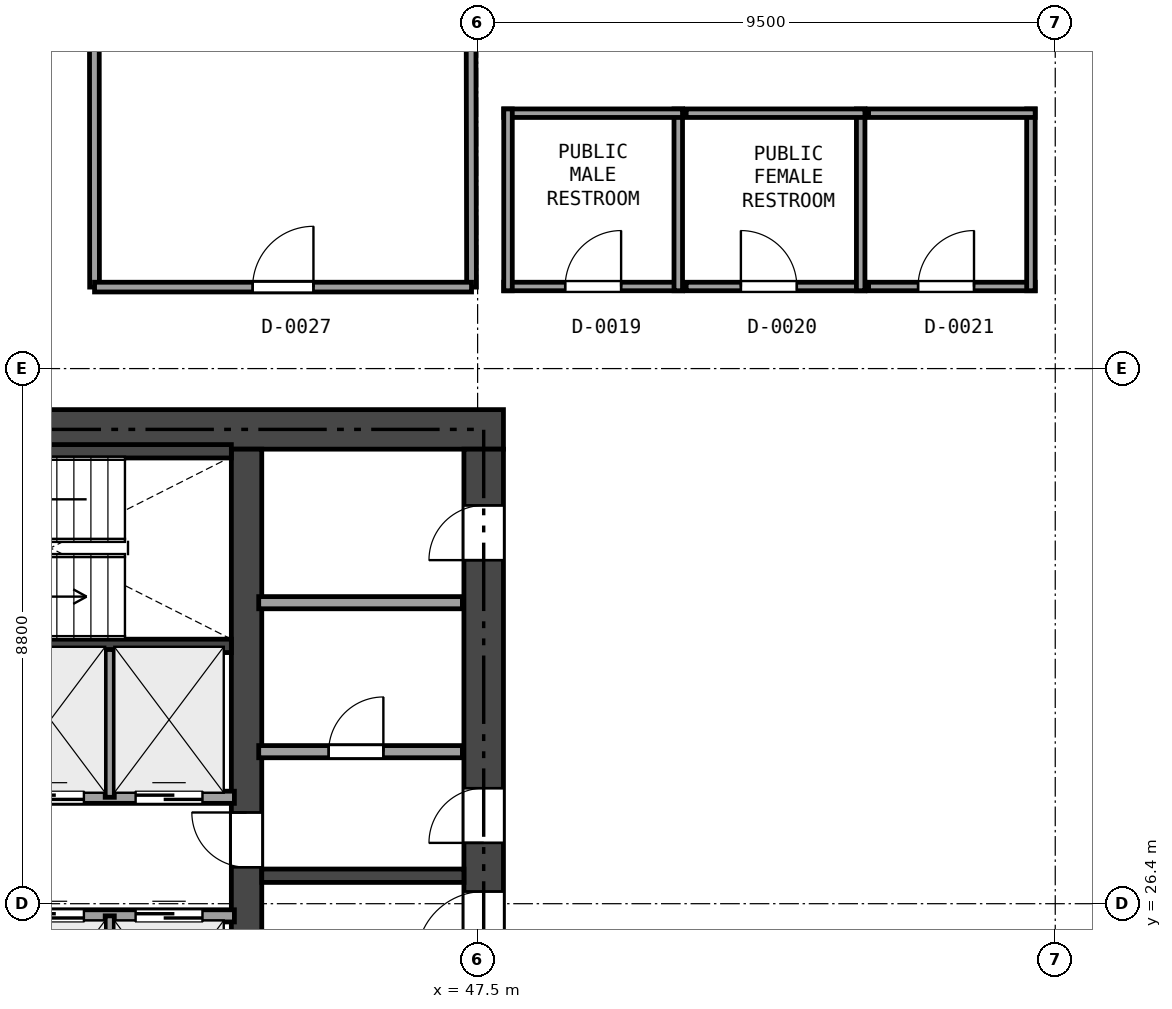
"""IFC4 building model, lengths in metres.
Left out: names, types, materials, properties, quantities, classifications, styles, units other than length and angle.
Written with IfcOpenShell. Run it as: python <this file> out.ifc"""

import sys

from ifc_helpers import new_model, si_unit, direction, frame, frame_2d, origin, place, context, subcontext, project, spatial, rectangle, extrude, element, fill, save


model = new_model("IFC4")
c1 = context("Model", 3, precision=1e-05, world=origin(), true_north=direction((0.0, 1.0)))
c2 = subcontext(c1, "Body", "Model", "MODEL_VIEW")
j1 = project(units=[si_unit("LENGTHUNIT", "METRE"), si_unit("PLANEANGLEUNIT", "RADIAN")], contexts=[c1])
p1 = place(None, origin())
s1 = spatial("IfcSite", under=j1, at=p1, CompositionType="ELEMENT")
p2 = place(p1, origin())
s2 = spatial("IfcBuilding", under=s1, at=p2, CompositionType="ELEMENT")
p3 = place(p2, origin())
s3 = spatial("IfcBuildingStorey", under=s2, at=p3, CompositionType="ELEMENT", Elevation=0.0)
p4 = place(p3, frame((26.475, 34.2, 0.0), z_axis=(0.0, 0.0, 1.0), x_axis=(1.0, 0.0, 0.0)))
e1 = element("IfcWall", 1, at=p4, inside=s3, PredefinedType="SHEAR", context=c2, shape_type="SweptSolid", body=[
    extrude(rectangle(XDim=21.45, YDim=0.65, at=frame_2d((10.725, 0.0))), origin(), (0.0, 0.0, 1.0), 5.05),
])
p5 = place(p4, frame((9.725, 0.0, 0.0)))
e2 = element("IfcOpeningElement", 2, at=p5, cuts=e1, PredefinedType="OPENING", context=c2, shape_type="SweptSolid", body=[
    extrude(rectangle(XDim=1.1, YDim=2.15, at=frame_2d((0.55, 1.075))), frame((0.0, 0.335, 0.0), z_axis=(0.0, -1.0, 0.0), x_axis=(1.0, 0.0, 0.0)), (0.0, 0.0, 1.0), 0.67),
])
p6 = place(p4, frame((1.975, 0.0, 0.0)))
e3 = element("IfcOpeningElement", 3, at=p6, cuts=e1, PredefinedType="OPENING", context=c2, shape_type="SweptSolid", body=[
    extrude(rectangle(XDim=0.9, YDim=2.1, at=frame_2d((0.45, 1.05))), frame((0.0, 0.335, 0.0), z_axis=(0.0, -1.0, 0.0), x_axis=(1.0, 0.0, 0.0)), (0.0, 0.0, 1.0), 0.67),
])
p7 = place(p4, frame((6.275, 0.0, 0.0)))
e4 = element("IfcOpeningElement", 4, at=p7, cuts=e1, PredefinedType="OPENING", context=c2, shape_type="SweptSolid", body=[
    extrude(rectangle(XDim=0.9, YDim=2.1, at=frame_2d((0.45, 1.05))), frame((0.0, 0.335, 0.0), z_axis=(0.0, -1.0, 0.0), x_axis=(1.0, 0.0, 0.0)), (0.0, 0.0, 1.0), 0.67),
])
p8 = place(p3, frame((47.6, 18.925, 0.0), z_axis=(0.0, 0.0, 1.0), x_axis=(0.0, 1.0, 0.0)))
e5 = element("IfcWall", 5, at=p8, inside=s3, PredefinedType="SHEAR", context=c2, shape_type="SweptSolid", body=[
    extrude(rectangle(XDim=14.95, YDim=0.65, at=frame_2d((7.475, 0.0))), origin(), (0.0, 0.0, 1.0), 5.05),
])
p9 = place(p8, frame((6.575, 0.0, 0.0)))
e6 = element("IfcOpeningElement", 6, at=p9, cuts=e5, PredefinedType="OPENING", context=c2, shape_type="SweptSolid", body=[
    extrude(rectangle(XDim=1.1, YDim=2.15, at=frame_2d((0.55, 1.075))), frame((0.0, 0.335, 0.0), z_axis=(0.0, -1.0, 0.0), x_axis=(1.0, 0.0, 0.0)), (0.0, 0.0, 1.0), 0.67),
])
p10 = place(p8, frame((8.475, 0.0, 0.0)))
e7 = element("IfcOpeningElement", 7, at=p10, cuts=e5, PredefinedType="OPENING", context=c2, shape_type="SweptSolid", body=[
    extrude(rectangle(XDim=0.9, YDim=2.1, at=frame_2d((0.45, 1.05))), frame((0.0, 0.335, 0.0), z_axis=(0.0, -1.0, 0.0), x_axis=(1.0, 0.0, 0.0)), (0.0, 0.0, 1.0), 0.67),
])
p11 = place(p8, frame((13.125, 0.0, 0.0)))
e8 = element("IfcOpeningElement", 8, at=p11, cuts=e5, PredefinedType="OPENING", context=c2, shape_type="SweptSolid", body=[
    extrude(rectangle(XDim=0.9, YDim=2.1, at=frame_2d((0.45, 1.05))), frame((0.0, 0.335, 0.0), z_axis=(0.0, -1.0, 0.0), x_axis=(1.0, 0.0, 0.0)), (0.0, 0.0, 1.0), 0.67),
])
p12 = place(p3, frame((43.7, 18.925, 0.0), z_axis=(0.0, 0.0, 1.0), x_axis=(0.0, 1.0, 0.0)))
e9 = element("IfcWall", 9, at=p12, inside=s3, PredefinedType="SHEAR", context=c2, shape_type="SweptSolid", body=[
    extrude(rectangle(XDim=14.95, YDim=0.5, at=frame_2d((7.475, 0.0))), origin(), (0.0, 0.0, 1.0), 5.05),
])
p13 = place(p12, frame((8.075, 0.0, 0.0)))
e10 = element("IfcOpeningElement", 10, at=p13, cuts=e9, PredefinedType="OPENING", context=c2, shape_type="SweptSolid", body=[
    extrude(rectangle(XDim=0.9, YDim=2.1, at=frame_2d((0.45, 1.05))), frame((0.0, 0.26, 0.0), z_axis=(0.0, -1.0, 0.0), x_axis=(1.0, 0.0, 0.0)), (0.0, 0.0, 1.0), 0.52),
])
p14 = place(p3, frame((43.95, 26.86, 0.0), z_axis=(0.0, 0.0, 1.0), x_axis=(1.0, 0.0, 0.0)))
e11 = element("IfcWall", 11, at=p14, inside=s3, PredefinedType="SHEAR", context=c2, shape_type="SweptSolid", body=[
    extrude(rectangle(XDim=3.325, YDim=0.22, at=frame_2d((1.663, 0.0))), origin(), (0.0, 0.0, 1.0), 5.05),
])
p15 = place(p3, frame((35.84, 30.64, 0.0), z_axis=(0.0, 0.0, 1.0), x_axis=(1.0, 0.0, 0.0)))
e12 = element("IfcWall", 12, at=p15, inside=s3, PredefinedType="SHEAR", context=c2, shape_type="SweptSolid", body=[
    extrude(rectangle(XDim=7.61, YDim=0.22, at=frame_2d((3.805, 0.0))), origin(), (0.0, 0.0, 1.0), 5.05),
])
p16 = place(p3, frame((37.55, 33.84, 0.0), z_axis=(0.0, 0.0, 1.0), x_axis=(1.0, 0.0, 0.0)))
e13 = element("IfcWall", 13, at=p16, inside=s3, PredefinedType="SHEAR", context=c2, shape_type="SweptSolid", body=[
    extrude(rectangle(XDim=5.9, YDim=0.22, at=frame_2d((2.95, 0.0))), origin(), (0.0, 0.0, 1.0), 5.05),
])
p17 = place(p3, frame((43.9, 28.9, 0.0), z_axis=(0.0, 0.0, 1.0), x_axis=(1.0, 0.0, 0.0)))
e14 = element("IfcWall", 14, at=p17, inside=s3, PredefinedType="SOLIDWALL", context=c2, shape_type="SweptSolid", body=[
    extrude(rectangle(XDim=3.35, YDim=0.2, at=frame_2d((1.675, 0.0))), origin(), (0.0, 0.0, 1.0), 5.05),
])
p18 = place(p17, frame((1.15, 0.0, 0.0)))
e15 = element("IfcOpeningElement", 15, at=p18, cuts=e14, PredefinedType="OPENING", context=c2, shape_type="SweptSolid", body=[
    extrude(rectangle(XDim=0.9, YDim=2.1, at=frame_2d((0.45, 1.05))), frame((0.0, 0.11, 0.0), z_axis=(0.0, -1.0, 0.0), x_axis=(1.0, 0.0, 0.0)), (0.0, 0.0, 1.0), 0.22),
])
p19 = place(p3, frame((43.9, 31.35, 0.0), z_axis=(0.0, 0.0, 1.0), x_axis=(1.0, 0.0, 0.0)))
e16 = element("IfcWall", 16, at=p19, inside=s3, PredefinedType="SOLIDWALL", context=c2, shape_type="SweptSolid", body=[
    extrude(rectangle(XDim=3.35, YDim=0.2, at=frame_2d((1.675, 0.0))), origin(), (0.0, 0.0, 1.0), 5.05),
])
p20 = place(p3, frame((35.62, 28.15, 0.0), z_axis=(0.0, 0.0, 1.0), x_axis=(1.0, 0.0, 0.0)))
e17 = element("IfcWall", 17, at=p20, inside=s3, PredefinedType="SOLIDWALL", context=c2, shape_type="SweptSolid", body=[
    extrude(rectangle(XDim=7.88, YDim=0.2, at=frame_2d((3.94, 0.0))), origin(), (0.0, 0.0, 1.0), 5.05),
])
p21 = place(p20, frame((0.405, 0.0, 0.0)))
e18 = element("IfcOpeningElement", 18, at=p21, cuts=e17, PredefinedType="OPENING", context=c2, shape_type="SweptSolid", body=[
    extrude(rectangle(XDim=1.1, YDim=2.15, at=frame_2d((0.55, 1.075))), frame((0.0, 0.11, 0.0), z_axis=(0.0, -1.0, 0.0), x_axis=(1.0, 0.0, 0.0)), (0.0, 0.0, 1.0), 0.22),
])
p22 = place(p20, frame((2.355, 0.0, 0.0)))
e19 = element("IfcOpeningElement", 19, at=p22, cuts=e17, PredefinedType="OPENING", context=c2, shape_type="SweptSolid", body=[
    extrude(rectangle(XDim=1.1, YDim=2.15, at=frame_2d((0.55, 1.075))), frame((0.0, 0.11, 0.0), z_axis=(0.0, -1.0, 0.0), x_axis=(1.0, 0.0, 0.0)), (0.0, 0.0, 1.0), 0.22),
])
p23 = place(p20, frame((4.305, 0.0, 0.0)))
e20 = element("IfcOpeningElement", 20, at=p23, cuts=e17, PredefinedType="OPENING", context=c2, shape_type="SweptSolid", body=[
    extrude(rectangle(XDim=1.1, YDim=2.15, at=frame_2d((0.55, 1.075))), frame((0.0, 0.11, 0.0), z_axis=(0.0, -1.0, 0.0), x_axis=(1.0, 0.0, 0.0)), (0.0, 0.0, 1.0), 0.22),
])
p24 = place(p20, frame((6.255, 0.0, 0.0)))
e21 = element("IfcOpeningElement", 21, at=p24, cuts=e17, PredefinedType="OPENING", context=c2, shape_type="SweptSolid", body=[
    extrude(rectangle(XDim=1.1, YDim=2.15, at=frame_2d((0.55, 1.075))), frame((0.0, 0.11, 0.0), z_axis=(0.0, -1.0, 0.0), x_axis=(1.0, 0.0, 0.0)), (0.0, 0.0, 1.0), 0.22),
])
p25 = place(p3, frame((35.62, 26.2, 0.0), z_axis=(0.0, 0.0, 1.0), x_axis=(1.0, 0.0, 0.0)))
e22 = element("IfcWall", 22, at=p25, inside=s3, PredefinedType="SOLIDWALL", context=c2, shape_type="SweptSolid", body=[
    extrude(rectangle(XDim=7.88, YDim=0.2, at=frame_2d((3.94, 0.0))), origin(), (0.0, 0.0, 1.0), 5.05),
])
p26 = place(p25, frame((0.405, 0.0, 0.0)))
e23 = element("IfcOpeningElement", 23, at=p26, cuts=e22, PredefinedType="OPENING", context=c2, shape_type="SweptSolid", body=[
    extrude(rectangle(XDim=1.1, YDim=2.15, at=frame_2d((0.55, 1.075))), frame((0.0, 0.11, 0.0), z_axis=(0.0, -1.0, 0.0), x_axis=(1.0, 0.0, 0.0)), (0.0, 0.0, 1.0), 0.22),
])
p27 = place(p25, frame((2.355, 0.0, 0.0)))
e24 = element("IfcOpeningElement", 24, at=p27, cuts=e22, PredefinedType="OPENING", context=c2, shape_type="SweptSolid", body=[
    extrude(rectangle(XDim=1.1, YDim=2.15, at=frame_2d((0.55, 1.075))), frame((0.0, 0.11, 0.0), z_axis=(0.0, -1.0, 0.0), x_axis=(1.0, 0.0, 0.0)), (0.0, 0.0, 1.0), 0.22),
])
p28 = place(p25, frame((4.305, 0.0, 0.0)))
e25 = element("IfcOpeningElement", 25, at=p28, cuts=e22, PredefinedType="OPENING", context=c2, shape_type="SweptSolid", body=[
    extrude(rectangle(XDim=1.1, YDim=2.15, at=frame_2d((0.55, 1.075))), frame((0.0, 0.11, 0.0), z_axis=(0.0, -1.0, 0.0), x_axis=(1.0, 0.0, 0.0)), (0.0, 0.0, 1.0), 0.22),
])
p29 = place(p25, frame((6.255, 0.0, 0.0)))
e26 = element("IfcOpeningElement", 26, at=p29, cuts=e22, PredefinedType="OPENING", context=c2, shape_type="SweptSolid", body=[
    extrude(rectangle(XDim=1.1, YDim=2.15, at=frame_2d((0.55, 1.075))), frame((0.0, 0.11, 0.0), z_axis=(0.0, -1.0, 0.0), x_axis=(1.0, 0.0, 0.0)), (0.0, 0.0, 1.0), 0.22),
])
p30 = place(p3, frame((41.45, 28.15, 0.0), z_axis=(0.0, 0.0, 1.0), x_axis=(0.0, 1.0, 0.0)))
e27 = element("IfcWall", 27, at=p30, inside=s3, PredefinedType="PARTITIONING", context=c2, shape_type="SweptSolid", body=[
    extrude(rectangle(XDim=2.43, YDim=0.15, at=frame_2d((1.215, 0.0))), origin(), (0.0, 0.0, 1.0), 5.05),
])
p31 = place(p3, frame((41.45, 23.65, 0.0), z_axis=(0.0, 0.0, 1.0), x_axis=(0.0, 1.0, 0.0)))
e28 = element("IfcWall", 28, at=p31, inside=s3, PredefinedType="PARTITIONING", context=c2, shape_type="SweptSolid", body=[
    extrude(rectangle(XDim=2.55, YDim=0.15, at=frame_2d((1.275, 0.0))), origin(), (0.0, 0.0, 1.0), 4.571),
])
p32 = place(p3, frame((47.93, 36.55, 0.0), z_axis=(0.0, 0.0, 1.0), x_axis=(1.0, 0.0, 0.0)))
e29 = element("IfcWall", 29, at=p32, inside=s3, PredefinedType="PARTITIONING", context=c2, shape_type="SweptSolid", body=[
    extrude(rectangle(XDim=2.94, YDim=0.14, at=frame_2d((1.47, 0.0))), origin(), (0.0, 0.0, 1.0), 4.135),
])
p33 = place(p32, frame((1.01, 0.0, 0.0)))
e30 = element("IfcOpeningElement", 30, at=p33, cuts=e29, PredefinedType="OPENING", context=c2, shape_type="SweptSolid", body=[
    extrude(rectangle(XDim=0.92, YDim=2.1, at=frame_2d((0.46, 1.05))), frame((0.0, 0.08, 0.0), z_axis=(0.0, -1.0, 0.0), x_axis=(1.0, 0.0, 0.0)), (0.0, 0.0, 1.0), 0.16),
])
p34 = place(p3, frame((50.8, 36.48, 0.0), z_axis=(0.0, 0.0, 1.0), x_axis=(0.0, 1.0, 0.0)))
e31 = element("IfcWall", 31, at=p34, inside=s3, PredefinedType="PARTITIONING", context=c2, shape_type="SweptSolid", body=[
    extrude(rectangle(XDim=2.99, YDim=0.14, at=frame_2d((1.495, 0.0))), origin(), (0.0, 0.0, 1.0), 4.679),
])
p35 = place(p3, frame((50.87, 39.4, 0.0), z_axis=(0.0, 0.0, 1.0), x_axis=(-1.0, 0.0, 0.0)))
e32 = element("IfcWall", 32, at=p35, inside=s3, PredefinedType="PARTITIONING", context=c2, shape_type="SweptSolid", body=[
    extrude(rectangle(XDim=2.94, YDim=0.14, at=frame_2d((1.47, 0.0))), origin(), (0.0, 0.0, 1.0), 4.135),
])
p36 = place(p3, frame((48.0, 39.47, 0.0), z_axis=(0.0, 0.0, 1.0), x_axis=(0.0, -1.0, 0.0)))
e33 = element("IfcWall", 33, at=p36, inside=s3, PredefinedType="PARTITIONING", context=c2, shape_type="SweptSolid", body=[
    extrude(rectangle(XDim=2.99, YDim=0.14, at=frame_2d((1.495, 0.0))), origin(), (0.0, 0.0, 1.0), 4.135),
])
p37 = place(p3, frame((50.93, 36.55, 0.0), z_axis=(0.0, 0.0, 1.0), x_axis=(1.0, 0.0, 0.0)))
e34 = element("IfcWall", 34, at=p37, inside=s3, PredefinedType="PARTITIONING", context=c2, shape_type="SweptSolid", body=[
    extrude(rectangle(XDim=2.94, YDim=0.14, at=frame_2d((1.47, 0.0))), origin(), (0.0, 0.0, 1.0), 5.05),
])
p38 = place(p37, frame((0.9, 0.0, 0.0)))
e35 = element("IfcOpeningElement", 35, at=p38, cuts=e34, PredefinedType="OPENING", context=c2, shape_type="SweptSolid", body=[
    extrude(rectangle(XDim=0.92, YDim=2.1, at=frame_2d((0.46, 1.05))), frame((0.0, 0.08, 0.0), z_axis=(0.0, -1.0, 0.0), x_axis=(1.0, 0.0, 0.0)), (0.0, 0.0, 1.0), 0.16),
])
p39 = place(p3, frame((53.8, 36.48, 0.0), z_axis=(0.0, 0.0, 1.0), x_axis=(0.0, 1.0, 0.0)))
e36 = element("IfcWall", 36, at=p39, inside=s3, PredefinedType="PARTITIONING", context=c2, shape_type="SweptSolid", body=[
    extrude(rectangle(XDim=2.99, YDim=0.14, at=frame_2d((1.495, 0.0))), origin(), (0.0, 0.0, 1.0), 4.679),
])
p40 = place(p3, frame((53.87, 39.4, 0.0), z_axis=(0.0, 0.0, 1.0), x_axis=(-1.0, 0.0, 0.0)))
e37 = element("IfcWall", 37, at=p40, inside=s3, PredefinedType="PARTITIONING", context=c2, shape_type="SweptSolid", body=[
    extrude(rectangle(XDim=2.94, YDim=0.14, at=frame_2d((1.47, 0.0))), origin(), (0.0, 0.0, 1.0), 4.679),
])
p41 = place(p3, frame((53.93, 36.55, 0.0), z_axis=(0.0, 0.0, 1.0), x_axis=(1.0, 0.0, 0.0)))
e38 = element("IfcWall", 38, at=p41, inside=s3, PredefinedType="PARTITIONING", context=c2, shape_type="SweptSolid", body=[
    extrude(rectangle(XDim=2.74, YDim=0.14, at=frame_2d((1.37, 0.0))), origin(), (0.0, 0.0, 1.0), 5.05),
])
p42 = place(p41, frame((0.814, 0.0, 0.0)))
e39 = element("IfcOpeningElement", 39, at=p42, cuts=e38, PredefinedType="OPENING", context=c2, shape_type="SweptSolid", body=[
    extrude(rectangle(XDim=0.92, YDim=2.1, at=frame_2d((0.46, 1.05))), frame((0.0, 0.08, 0.0), z_axis=(0.0, -1.0, 0.0), x_axis=(1.0, 0.0, 0.0)), (0.0, 0.0, 1.0), 0.16),
])
p43 = place(p3, frame((56.6, 36.48, 0.0), z_axis=(0.0, 0.0, 1.0), x_axis=(0.0, 1.0, 0.0)))
e40 = element("IfcWall", 40, at=p43, inside=s3, PredefinedType="PARTITIONING", context=c2, shape_type="SweptSolid", body=[
    extrude(rectangle(XDim=2.99, YDim=0.14, at=frame_2d((1.495, 0.0))), origin(), (0.0, 0.0, 1.0), 4.679),
])
p44 = place(p3, frame((56.67, 39.4, 0.0), z_axis=(0.0, 0.0, 1.0), x_axis=(-1.0, 0.0, 0.0)))
e41 = element("IfcWall", 41, at=p44, inside=s3, PredefinedType="PARTITIONING", context=c2, shape_type="SweptSolid", body=[
    extrude(rectangle(XDim=2.74, YDim=0.14, at=frame_2d((1.37, 0.0))), origin(), (0.0, 0.0, 1.0), 4.679),
])
p45 = place(p3, frame((47.4, 36.54, 0.0), z_axis=(0.0, 0.0, 1.0), x_axis=(-0.0017799471, 0.999998415893, 0.0)))
e42 = element("IfcWall", 42, at=p45, inside=s3, PredefinedType="PARTITIONING", context=c2, shape_type="SweptSolid", body=[
    extrude(rectangle(XDim=16.185, YDim=0.16, at=frame_2d((8.093, 0.0))), origin(), (0.0, 0.0, 1.0), 4.123),
])
p46 = place(p3, frame((41.188, 52.721, 0.0), z_axis=(0.0, 0.0, 1.0), x_axis=(0.000739321131, -0.999999726702, 0.0)))
e43 = element("IfcWall", 43, at=p46, inside=s3, PredefinedType="PARTITIONING", context=c2, shape_type="SweptSolid", body=[
    extrude(rectangle(XDim=16.181, YDim=0.16, at=frame_2d((8.09, 0.0))), origin(), (0.0, 0.0, 1.0), 4.123),
])
p47 = place(p3, frame((41.2, 36.54, 0.0), z_axis=(0.0, 0.0, 1.0), x_axis=(1.0, 0.0, 0.0)))
e44 = element("IfcWall", 44, at=p47, inside=s3, PredefinedType="PARTITIONING", context=c2, shape_type="SweptSolid", body=[
    extrude(rectangle(XDim=6.2, YDim=0.16, at=frame_2d((3.1, 0.0))), origin(), (0.0, 0.0, 1.0), 5.05),
])
p48 = place(p47, frame((2.6, 0.0, 0.0)))
e45 = element("IfcOpeningElement", 45, at=p48, cuts=e44, PredefinedType="OPENING", context=c2, shape_type="SweptSolid", body=[
    extrude(rectangle(XDim=1.0, YDim=2.15, at=frame_2d((0.5, 1.075))), frame((0.0, 0.09, 0.0), z_axis=(0.0, -1.0, 0.0), x_axis=(1.0, 0.0, 0.0)), (0.0, 0.0, 1.0), 0.18),
])
p49 = place(p9, origin())
e46 = element("IfcDoor", 46, at=p49, inside=s3, OperationType="SINGLE_SWING_LEFT", PredefinedType="DOOR", context=c2, shape_type="SweptSolid", body=[
    extrude(rectangle(XDim=1.1, YDim=2.15, at=frame_2d((0.55, 1.075))), frame((0.0, 0.025, 0.0), z_axis=(0.0, -1.0, 0.0), x_axis=(1.0, 0.0, 0.0)), (0.0, 0.0, 1.0), 0.05),
])
fill(e6, e46)
p50 = place(p13, origin())
e47 = element("IfcDoor", 47, at=p50, inside=s3, OperationType="SINGLE_SWING_RIGHT", PredefinedType="DOOR", context=c2, shape_type="SweptSolid", body=[
    extrude(rectangle(XDim=0.9, YDim=2.1, at=frame_2d((0.45, 1.05))), frame((0.0, 0.025, 0.0), z_axis=(0.0, -1.0, 0.0), x_axis=(1.0, 0.0, 0.0)), (0.0, 0.0, 1.0), 0.05),
])
fill(e10, e47)
p51 = place(p10, origin())
e48 = element("IfcDoor", 48, at=p51, inside=s3, OperationType="SINGLE_SWING_LEFT", PredefinedType="DOOR", context=c2, shape_type="SweptSolid", body=[
    extrude(rectangle(XDim=0.9, YDim=2.1, at=frame_2d((0.45, 1.05))), frame((0.0, 0.025, 0.0), z_axis=(0.0, -1.0, 0.0), x_axis=(1.0, 0.0, 0.0)), (0.0, 0.0, 1.0), 0.05),
])
fill(e7, e48)
p52 = place(p18, origin())
e49 = element("IfcDoor", 49, at=p52, inside=s3, OperationType="SINGLE_SWING_RIGHT", PredefinedType="DOOR", context=c2, shape_type="SweptSolid", body=[
    extrude(rectangle(XDim=0.9, YDim=2.1, at=frame_2d((0.45, 1.05))), frame((0.0, 0.025, 0.0), z_axis=(0.0, -1.0, 0.0), x_axis=(1.0, 0.0, 0.0)), (0.0, 0.0, 1.0), 0.05),
])
fill(e15, e49)
p53 = place(p11, origin())
e50 = element("IfcDoor", 50, at=p53, inside=s3, OperationType="SINGLE_SWING_LEFT", PredefinedType="DOOR", context=c2, shape_type="SweptSolid", body=[
    extrude(rectangle(XDim=0.9, YDim=2.1, at=frame_2d((0.45, 1.05))), frame((0.0, 0.025, 0.0), z_axis=(0.0, -1.0, 0.0), x_axis=(1.0, 0.0, 0.0)), (0.0, 0.0, 1.0), 0.05),
])
fill(e8, e50)
p54 = place(p28, origin())
e51 = element("IfcDoor", 51, at=p54, inside=s3, OperationType="SLIDING_TO_LEFT", PredefinedType="DOOR", context=c2, shape_type="SweptSolid", body=[
    extrude(rectangle(XDim=1.1, YDim=2.15, at=frame_2d((0.55, 1.075))), frame((0.0, 0.025, 0.0), z_axis=(0.0, -1.0, 0.0), x_axis=(1.0, 0.0, 0.0)), (0.0, 0.0, 1.0), 0.05),
])
fill(e25, e51)
p55 = place(p23, origin())
e52 = element("IfcDoor", 52, at=p55, inside=s3, OperationType="SLIDING_TO_LEFT", PredefinedType="DOOR", context=c2, shape_type="SweptSolid", body=[
    extrude(rectangle(XDim=1.1, YDim=2.15, at=frame_2d((0.55, 1.075))), frame((0.0, 0.025, 0.0), z_axis=(0.0, -1.0, 0.0), x_axis=(1.0, 0.0, 0.0)), (0.0, 0.0, 1.0), 0.05),
])
fill(e20, e52)
p56 = place(p29, origin())
e53 = element("IfcDoor", 53, at=p56, inside=s3, OperationType="SLIDING_TO_LEFT", PredefinedType="DOOR", context=c2, shape_type="SweptSolid", body=[
    extrude(rectangle(XDim=1.1, YDim=2.15, at=frame_2d((0.55, 1.075))), frame((0.0, 0.025, 0.0), z_axis=(0.0, -1.0, 0.0), x_axis=(1.0, 0.0, 0.0)), (0.0, 0.0, 1.0), 0.05),
])
fill(e26, e53)
p57 = place(p24, origin())
e54 = element("IfcDoor", 54, at=p57, inside=s3, OperationType="SLIDING_TO_LEFT", PredefinedType="DOOR", context=c2, shape_type="SweptSolid", body=[
    extrude(rectangle(XDim=1.1, YDim=2.15, at=frame_2d((0.55, 1.075))), frame((0.0, 0.025, 0.0), z_axis=(0.0, -1.0, 0.0), x_axis=(1.0, 0.0, 0.0)), (0.0, 0.0, 1.0), 0.05),
])
fill(e21, e54)
p58 = place(p33, origin())
e55 = element("IfcDoor", 55, at=p58, inside=s3, OperationType="SINGLE_SWING_RIGHT", PredefinedType="DOOR", context=c2, shape_type="SweptSolid", body=[
    extrude(rectangle(XDim=0.92, YDim=2.1, at=frame_2d((0.46, 1.05))), frame((0.0, 0.025, 0.0), z_axis=(0.0, -1.0, 0.0), x_axis=(1.0, 0.0, 0.0)), (0.0, 0.0, 1.0), 0.05),
])
fill(e30, e55)
p59 = place(p38, origin())
e56 = element("IfcDoor", 56, at=p59, inside=s3, OperationType="SINGLE_SWING_LEFT", PredefinedType="DOOR", context=c2, shape_type="SweptSolid", body=[
    extrude(rectangle(XDim=0.92, YDim=2.1, at=frame_2d((0.46, 1.05))), frame((0.0, 0.025, 0.0), z_axis=(0.0, -1.0, 0.0), x_axis=(1.0, 0.0, 0.0)), (0.0, 0.0, 1.0), 0.05),
])
fill(e35, e56)
p60 = place(p42, origin())
e57 = element("IfcDoor", 57, at=p60, inside=s3, OperationType="SINGLE_SWING_RIGHT", PredefinedType="DOOR", context=c2, shape_type="SweptSolid", body=[
    extrude(rectangle(XDim=0.92, YDim=2.1, at=frame_2d((0.46, 1.05))), frame((0.0, 0.025, 0.0), z_axis=(0.0, -1.0, 0.0), x_axis=(1.0, 0.0, 0.0)), (0.0, 0.0, 1.0), 0.05),
])
fill(e39, e57)
p61 = place(p48, origin())
e58 = element("IfcDoor", 58, at=p61, inside=s3, OperationType="SINGLE_SWING_RIGHT", PredefinedType="DOOR", context=c2, shape_type="SweptSolid", body=[
    extrude(rectangle(XDim=1.0, YDim=2.15, at=frame_2d((0.5, 1.075))), frame((0.0, 0.025, 0.0), z_axis=(0.0, -1.0, 0.0), x_axis=(1.0, 0.0, 0.0)), (0.0, 0.0, 1.0), 0.05),
])
fill(e45, e58)
save(model, sys.argv[1])
